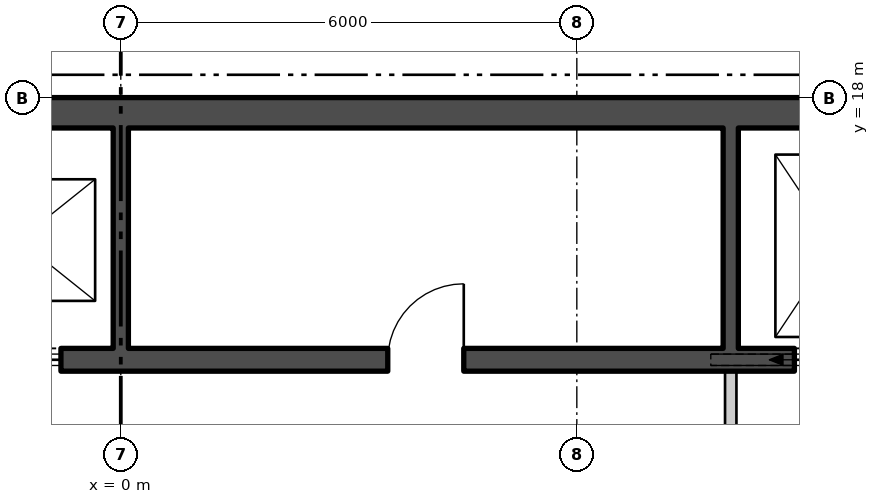
"""IFC4 building model, lengths in metres.
Left out: names, types, materials, properties, quantities, classifications, styles, units other than length and angle.
Written with IfcOpenShell. Run it as: python <this file> out.ifc"""

import sys

from ifc_helpers import new_model, si_unit, direction, frame, frame_2d, origin, place, context, subcontext, project, spatial, polyline, rectangle, outline, extrude, element, fill, save


model = new_model("IFC4")
c1 = context("Model", 3, precision=1e-05, world=origin(), true_north=direction((0.0, 1.0)))
c2 = subcontext(c1, "Body", "Model", "MODEL_VIEW")
j1 = project(units=[si_unit("LENGTHUNIT", "METRE"), si_unit("PLANEANGLEUNIT", "RADIAN")], contexts=[c1])
p1 = place(None, origin())
s1 = spatial("IfcSite", under=j1, at=p1, CompositionType="ELEMENT")
p2 = place(p1, origin())
s2 = spatial("IfcBuilding", under=s1, at=p2, CompositionType="ELEMENT")
p3 = place(p2, frame((0.0, 0.0, 268.8)))
s3 = spatial("IfcBuildingStorey", under=s2, at=p3, CompositionType="ELEMENT", Elevation=268.8)
p4 = place(p3, frame((2.67, -24.262, -0.18), z_axis=(0.0, 0.0, 1.0), x_axis=(0.499999764979, 0.866025539474, 0.0)))
e1 = element("IfcWall", 1, at=p4, inside=s3, PredefinedType="SOLIDWALL", context=c2, shape_type="SweptSolid", body=[
    extrude(outline(polyline([(-0.13, -0.225), (45.87, -0.225), (45.61, 0.225), (0.13, 0.225), (-0.13, -0.225)])), origin(), (0.0, 0.0, 1.0), 3.68),
])
p5 = place(p4, frame((1.424, 0.0, 1.08)))
e2 = element("IfcOpeningElement", 2, at=p5, cuts=e1, PredefinedType="OPENING", context=c2, shape_type="SweptSolid", body=[
    extrude(rectangle(XDim=2.4, YDim=2.0, at=frame_2d((1.2, 1.0))), frame((0.0, 0.235, 0.0), z_axis=(0.0, -1.0, 0.0), x_axis=(1.0, 0.0, 0.0)), (0.0, 0.0, 1.0), 0.47),
])
p6 = place(p4, frame((5.893, 0.0, 1.08)))
e3 = element("IfcOpeningElement", 3, at=p6, cuts=e1, PredefinedType="OPENING", context=c2, shape_type="SweptSolid", body=[
    extrude(rectangle(XDim=2.4, YDim=2.0, at=frame_2d((1.2, 1.0))), frame((0.0, 0.235, 0.0), z_axis=(0.0, -1.0, 0.0), x_axis=(1.0, 0.0, 0.0)), (0.0, 0.0, 1.0), 0.47),
])
p7 = place(p4, frame((10.401, 0.0, 1.08)))
e4 = element("IfcOpeningElement", 4, at=p7, cuts=e1, PredefinedType="OPENING", context=c2, shape_type="SweptSolid", body=[
    extrude(rectangle(XDim=2.4, YDim=2.0, at=frame_2d((1.2, 1.0))), frame((0.0, 0.235, 0.0), z_axis=(0.0, -1.0, 0.0), x_axis=(1.0, 0.0, 0.0)), (0.0, 0.0, 1.0), 0.47),
])
p8 = place(p4, frame((14.909, 0.0, 1.08)))
e5 = element("IfcOpeningElement", 5, at=p8, cuts=e1, PredefinedType="OPENING", context=c2, shape_type="SweptSolid", body=[
    extrude(rectangle(XDim=2.4, YDim=2.0, at=frame_2d((1.2, 1.0))), frame((0.0, 0.235, 0.0), z_axis=(0.0, -1.0, 0.0), x_axis=(1.0, 0.0, 0.0)), (0.0, 0.0, 1.0), 0.47),
])
p9 = place(p4, frame((23.924, 0.0, 1.08)))
e6 = element("IfcOpeningElement", 6, at=p9, cuts=e1, PredefinedType="OPENING", context=c2, shape_type="SweptSolid", body=[
    extrude(rectangle(XDim=2.4, YDim=2.0, at=frame_2d((1.2, 1.0))), frame((0.0, 0.235, 0.0), z_axis=(0.0, -1.0, 0.0), x_axis=(1.0, 0.0, 0.0)), (0.0, 0.0, 1.0), 0.47),
])
p10 = place(p4, frame((28.431, 0.0, 1.08)))
e7 = element("IfcOpeningElement", 7, at=p10, cuts=e1, PredefinedType="OPENING", context=c2, shape_type="SweptSolid", body=[
    extrude(rectangle(XDim=2.4, YDim=2.0, at=frame_2d((1.2, 1.0))), frame((0.0, 0.235, 0.0), z_axis=(0.0, -1.0, 0.0), x_axis=(1.0, 0.0, 0.0)), (0.0, 0.0, 1.0), 0.47),
])
p11 = place(p4, frame((32.939, 0.0, 1.08)))
e8 = element("IfcOpeningElement", 8, at=p11, cuts=e1, PredefinedType="OPENING", context=c2, shape_type="SweptSolid", body=[
    extrude(rectangle(XDim=2.4, YDim=2.0, at=frame_2d((1.2, 1.0))), frame((0.0, 0.235, 0.0), z_axis=(0.0, -1.0, 0.0), x_axis=(1.0, 0.0, 0.0)), (0.0, 0.0, 1.0), 0.47),
])
p12 = place(p4, frame((37.447, 0.0, 1.08)))
e9 = element("IfcOpeningElement", 9, at=p12, cuts=e1, PredefinedType="OPENING", context=c2, shape_type="SweptSolid", body=[
    extrude(rectangle(XDim=2.4, YDim=2.0, at=frame_2d((1.2, 1.0))), frame((0.0, 0.235, 0.0), z_axis=(0.0, -1.0, 0.0), x_axis=(1.0, 0.0, 0.0)), (0.0, 0.0, 1.0), 0.47),
])
p13 = place(p4, frame((41.916, 0.0, 1.08)))
e10 = element("IfcOpeningElement", 10, at=p13, cuts=e1, PredefinedType="OPENING", context=c2, shape_type="SweptSolid", body=[
    extrude(rectangle(XDim=2.4, YDim=2.0, at=frame_2d((1.2, 1.0))), frame((0.0, 0.235, 0.0), z_axis=(0.0, -1.0, 0.0), x_axis=(1.0, 0.0, 0.0)), (0.0, 0.0, 1.0), 0.47),
])
p14 = place(p3, frame((-14.5, 17.8, 0.0), z_axis=(0.0, 0.0, 1.0), x_axis=(1.0, 0.0, 0.0)))
e11 = element("IfcWall", 11, at=p14, inside=s3, PredefinedType="SHEAR", context=c2, shape_type="SweptSolid", body=[
    extrude(rectangle(XDim=29.0, YDim=0.4, at=frame_2d((14.5, 0.0))), origin(), (0.0, 0.0, 1.0), 3.7),
])
p15 = place(p3, frame((-10.7, 14.55, 0.0), z_axis=(0.0, 0.0, 1.0), x_axis=(1.0, 0.0, 0.0)))
e12 = element("IfcWall", 12, at=p15, inside=s3, PredefinedType="SHEAR", context=c2, shape_type="SweptSolid", body=[
    extrude(rectangle(XDim=21.4, YDim=0.3, at=frame_2d((10.7, 0.0))), origin(), (0.0, 0.0, 1.0), 3.7),
])
p16 = place(p15, frame((0.738, 0.0, 0.0)))
e13 = element("IfcOpeningElement", 13, at=p16, cuts=e12, PredefinedType="OPENING", context=c2, shape_type="SweptSolid", body=[
    extrude(rectangle(XDim=1.1, YDim=2.1, at=frame_2d((0.55, 1.05))), frame((0.0, 0.16, 0.0), z_axis=(0.0, -1.0, 0.0), x_axis=(1.0, 0.0, 0.0)), (0.0, 0.0, 1.0), 0.32),
])
p17 = place(p15, frame((3.462, 0.0, 0.0)))
e14 = element("IfcOpeningElement", 14, at=p17, cuts=e12, PredefinedType="OPENING", context=c2, shape_type="SweptSolid", body=[
    extrude(rectangle(XDim=1.1, YDim=2.1, at=frame_2d((0.55, 1.05))), frame((0.0, 0.16, 0.0), z_axis=(0.0, -1.0, 0.0), x_axis=(1.0, 0.0, 0.0)), (0.0, 0.0, 1.0), 0.32),
])
p18 = place(p15, frame((6.138, 0.0, 0.0)))
e15 = element("IfcOpeningElement", 15, at=p18, cuts=e12, PredefinedType="OPENING", context=c2, shape_type="SweptSolid", body=[
    extrude(rectangle(XDim=1.1, YDim=2.1, at=frame_2d((0.55, 1.05))), frame((0.0, 0.16, 0.0), z_axis=(0.0, -1.0, 0.0), x_axis=(1.0, 0.0, 0.0)), (0.0, 0.0, 1.0), 0.32),
])
p19 = place(p15, frame((8.812, 0.0, 0.0)))
e16 = element("IfcOpeningElement", 16, at=p19, cuts=e12, PredefinedType="OPENING", context=c2, shape_type="SweptSolid", body=[
    extrude(rectangle(XDim=1.1, YDim=2.1, at=frame_2d((0.55, 1.05))), frame((0.0, 0.16, 0.0), z_axis=(0.0, -1.0, 0.0), x_axis=(1.0, 0.0, 0.0)), (0.0, 0.0, 1.0), 0.32),
])
p20 = place(p15, frame((19.562, 0.0, 0.0)))
e17 = element("IfcOpeningElement", 17, at=p20, cuts=e12, PredefinedType="OPENING", context=c2, shape_type="SweptSolid", body=[
    extrude(rectangle(XDim=1.1, YDim=2.1, at=frame_2d((0.55, 1.05))), frame((0.0, 0.16, 0.0), z_axis=(0.0, -1.0, 0.0), x_axis=(1.0, 0.0, 0.0)), (0.0, 0.0, 1.0), 0.32),
])
p21 = place(p15, frame((14.213, 0.0, 0.0)))
e18 = element("IfcOpeningElement", 18, at=p21, cuts=e12, PredefinedType="OPENING", context=c2, shape_type="SweptSolid", body=[
    extrude(rectangle(XDim=1.0, YDim=2.1, at=frame_2d((0.5, 1.05))), frame((0.0, 0.16, 0.0), z_axis=(0.0, -1.0, 0.0), x_axis=(1.0, 0.0, 0.0)), (0.0, 0.0, 1.0), 0.32),
])
for number, where, z_axis, x_axis in (
    (19, (0.0, 14.7, 0.0), (0.0, 0.0, 1.0), (0.0, 1.0, 0.0)),
    (20, (8.025, 14.7, 0.0), (0.0, 0.0, 1.0), (0.0, 1.0, 0.0)),
):
    element("IfcWall", number, at=place(p3, frame(where, z_axis=z_axis, x_axis=x_axis)), inside=s3, PredefinedType="SHEAR", context=c2, shape_type="SweptSolid", body=[
        extrude(rectangle(XDim=2.9, YDim=0.2, at=frame_2d((1.45, 0.0))), origin(), (0.0, 0.0, 1.0), 3.7),
    ])
p22 = place(p3, frame((8.025, 10.8, 0.0), z_axis=(0.0, 0.0, 1.0), x_axis=(0.0, 1.0, 0.0)))
e21 = element("IfcWall", 21, at=p22, inside=s3, PredefinedType="PARTITIONING", context=c2, shape_type="SweptSolid", body=[
    extrude(rectangle(XDim=3.6, YDim=0.15, at=frame_2d((1.8, 0.0))), origin(), (0.0, 0.0, 1.0), 3.7),
])
p23 = place(p22, frame((1.175, 0.0, 0.0)))
e22 = element("IfcOpeningElement", 22, at=p23, cuts=e21, PredefinedType="OPENING", context=c2, shape_type="SweptSolid", body=[
    extrude(rectangle(XDim=1.25, YDim=2.1, at=frame_2d((0.625, 1.05))), frame((0.0, 0.085, 0.0), z_axis=(0.0, -1.0, 0.0), x_axis=(1.0, 0.0, 0.0)), (0.0, 0.0, 1.0), 0.17),
])
p24 = place(p19, origin())
e23 = element("IfcDoor", 23, at=p24, inside=s3, OperationType="SLIDING_TO_LEFT", PredefinedType="DOOR", context=c2, shape_type="SweptSolid", body=[
    extrude(rectangle(XDim=1.1, YDim=2.1, at=frame_2d((0.55, 1.05))), frame((0.0, 0.025, 0.0), z_axis=(0.0, -1.0, 0.0), x_axis=(1.0, 0.0, 0.0)), (0.0, 0.0, 1.0), 0.05),
])
fill(e16, e23)
p25 = place(p20, origin())
e24 = element("IfcDoor", 24, at=p25, inside=s3, OperationType="SLIDING_TO_LEFT", PredefinedType="DOOR", context=c2, shape_type="SweptSolid", body=[
    extrude(rectangle(XDim=1.1, YDim=2.1, at=frame_2d((0.55, 1.05))), frame((0.0, 0.025, 0.0), z_axis=(0.0, -1.0, 0.0), x_axis=(1.0, 0.0, 0.0)), (0.0, 0.0, 1.0), 0.05),
])
fill(e17, e24)
p26 = place(p21, origin())
e25 = element("IfcDoor", 25, at=p26, inside=s3, OperationType="SINGLE_SWING_LEFT", PredefinedType="DOOR", context=c2, shape_type="SweptSolid", body=[
    extrude(rectangle(XDim=1.0, YDim=2.1, at=frame_2d((0.5, 1.05))), frame((0.0, 0.025, 0.0), z_axis=(0.0, -1.0, 0.0), x_axis=(1.0, 0.0, 0.0)), (0.0, 0.0, 1.0), 0.05),
])
fill(e18, e25)
save(model, sys.argv[1])
